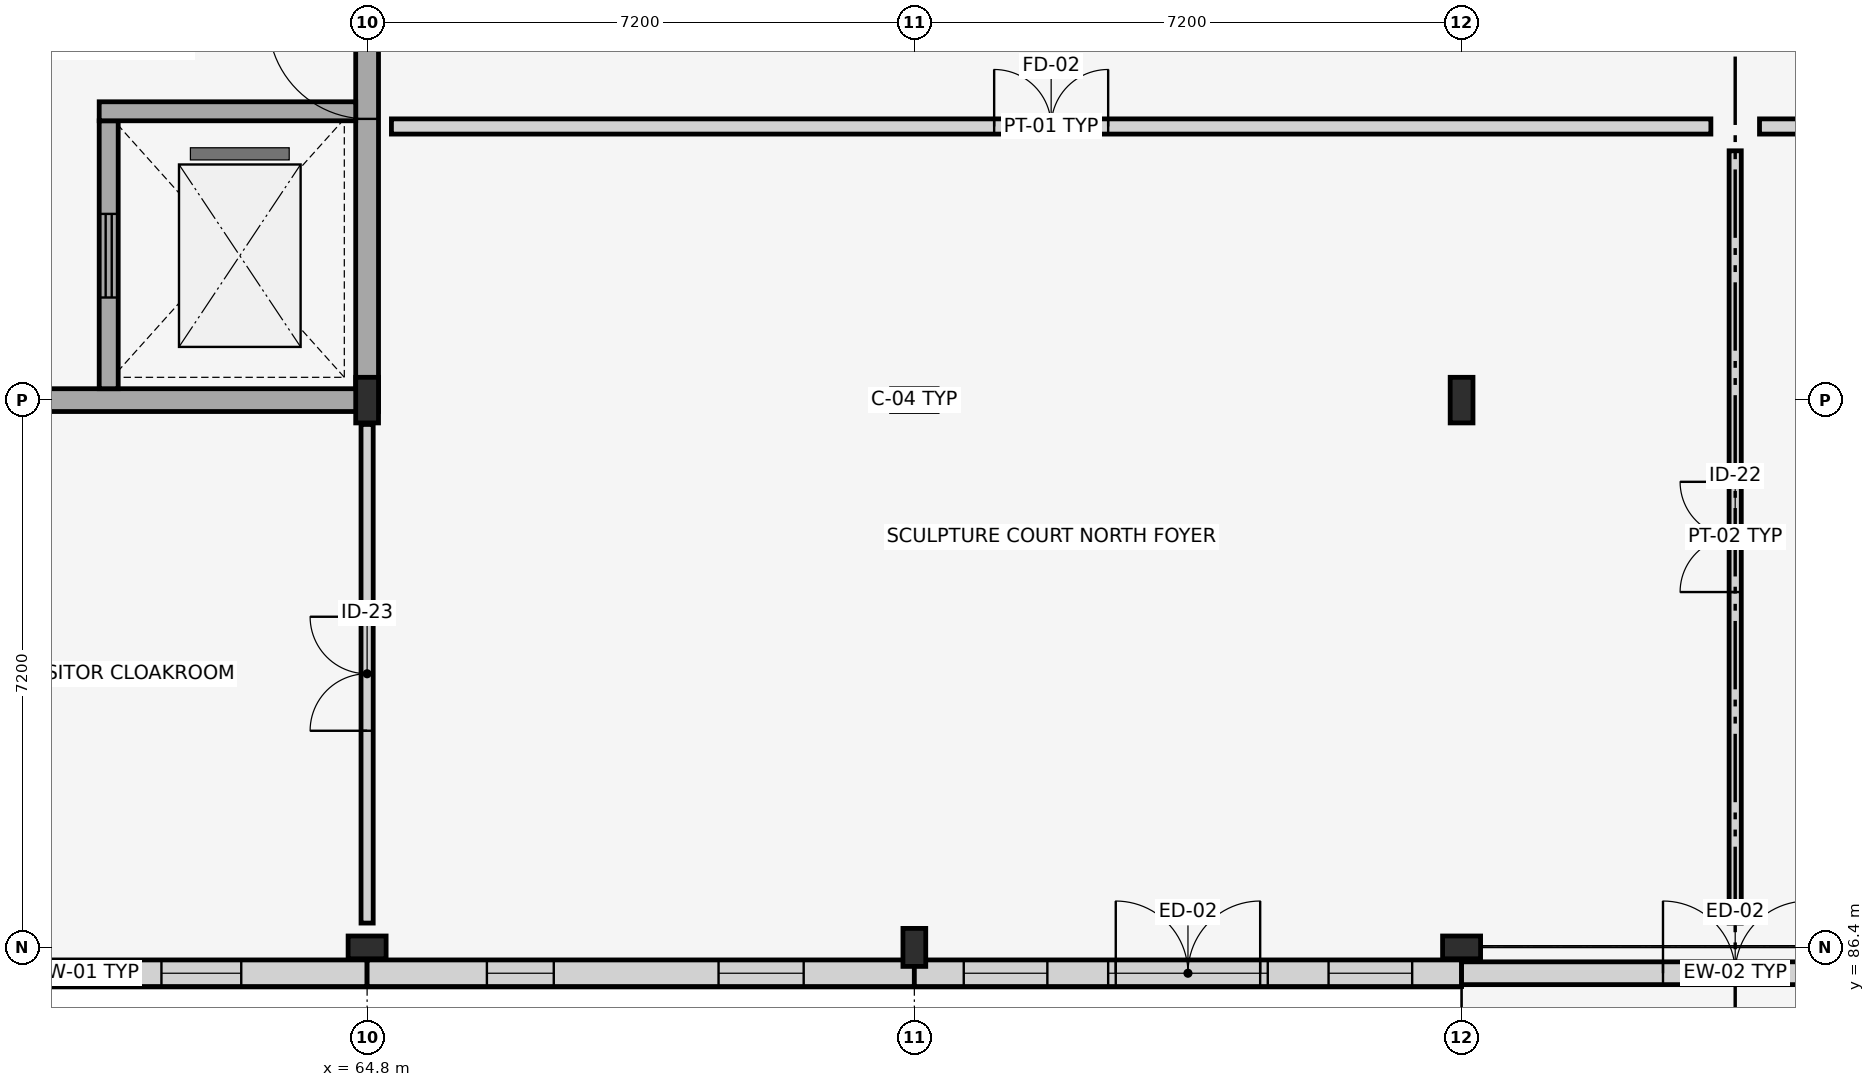
"""IFC4 building model, lengths in metres.
Left out: names, types, materials, properties, quantities, classifications, styles, units other than length and angle.
Written with IfcOpenShell. Run it as: python <this file> out.ifc"""

import sys

from ifc_helpers import new_model, si_unit, direction, frame, frame_2d, origin, origin_2d, place, context, subcontext, project, spatial, rectangle, i_section, extrude, element, fill, save


model = new_model("IFC4")
c1 = context("Model", 3, precision=1e-05, world=origin(), true_north=direction((0.0, 1.0)))
c2 = subcontext(c1, "Body", "Model", "MODEL_VIEW")
j1 = project(units=[si_unit("LENGTHUNIT", "METRE"), si_unit("PLANEANGLEUNIT", "RADIAN")], contexts=[c1])
p1 = place(None, origin())
s1 = spatial("IfcSite", under=j1, at=p1, CompositionType="ELEMENT")
p2 = place(p1, origin())
s2 = spatial("IfcBuilding", under=s1, at=p2, CompositionType="ELEMENT")
p3 = place(p2, origin())
s3 = spatial("IfcBuildingStorey", under=s2, at=p3, CompositionType="ELEMENT", Elevation=0.0)
p4 = place(p3, frame((64.8, 86.4, 0.0), z_axis=(0.0, 0.0, 1.0), x_axis=(0.0, 1.0, 0.0)))
e1 = element("IfcColumn", 1, at=p4, inside=s3, PredefinedType="COLUMN", context=c2, shape_type="SweptSolid", body=[
    extrude(i_section(OverallWidth=0.3, OverallDepth=0.5, WebThickness=0.014, FlangeThickness=0.028, FilletRadius=0.027, at=origin_2d()), origin(), (0.0, 0.0, 1.0), 4.5),
])
p5 = place(p3, frame((64.8, 93.6, 0.0), z_axis=(0.0, 0.0, 1.0), x_axis=(1.0, 0.0, 0.0)))
e2 = element("IfcColumn", 2, at=p5, inside=s3, PredefinedType="COLUMN", context=c2, shape_type="SweptSolid", body=[
    extrude(i_section(OverallWidth=0.3, OverallDepth=0.6, WebThickness=0.015, FlangeThickness=0.03, FilletRadius=0.027, at=origin_2d()), origin(), (0.0, 0.0, 1.0), 4.5),
])
p6 = place(p3, frame((72.0, 86.4, 0.0), z_axis=(0.0, 0.0, 1.0), x_axis=(1.0, 0.0, 0.0)))
e3 = element("IfcColumn", 3, at=p6, inside=s3, PredefinedType="COLUMN", context=c2, shape_type="SweptSolid", body=[
    extrude(i_section(OverallWidth=0.3, OverallDepth=0.5, WebThickness=0.014, FlangeThickness=0.028, FilletRadius=0.027, at=origin_2d()), origin(), (0.0, 0.0, 1.0), 4.5),
])
p7 = place(p3, frame((72.0, 93.6, 0.0), z_axis=(0.0, 0.0, 1.0), x_axis=(0.0, 1.0, 0.0)))
e4 = element("IfcColumn", 4, at=p7, inside=s3, PredefinedType="COLUMN", context=c2, shape_type="SweptSolid", body=[
    extrude(i_section(OverallWidth=0.3, OverallDepth=0.6, WebThickness=0.015, FlangeThickness=0.03, FilletRadius=0.027, at=origin_2d()), origin(), (0.0, 0.0, 1.0), 4.5),
])
p8 = place(p3, frame((79.2, 86.4, 0.0), z_axis=(0.0, 0.0, 1.0), x_axis=(0.0, 1.0, 0.0)))
e5 = element("IfcColumn", 5, at=p8, inside=s3, PredefinedType="COLUMN", context=c2, shape_type="SweptSolid", body=[
    extrude(i_section(OverallWidth=0.3, OverallDepth=0.5, WebThickness=0.014, FlangeThickness=0.028, FilletRadius=0.027, at=origin_2d()), origin(), (0.0, 0.0, 1.0), 4.5),
])
p9 = place(p3, frame((79.2, 93.6, 0.0), z_axis=(0.0, 0.0, 1.0), x_axis=(1.0, 0.0, 0.0)))
e6 = element("IfcColumn", 6, at=p9, inside=s3, PredefinedType="COLUMN", context=c2, shape_type="SweptSolid", body=[
    extrude(i_section(OverallWidth=0.3, OverallDepth=0.6, WebThickness=0.015, FlangeThickness=0.03, FilletRadius=0.027, at=origin_2d()), origin(), (0.0, 0.0, 1.0), 4.5),
])
p10 = place(p3, frame((57.435, 86.06, 0.0), z_axis=(0.0, 0.0, 1.0), x_axis=(1.0, 0.0, 0.0)))
e7 = element("IfcWall", 7, at=p10, inside=s3, PredefinedType="STANDARD", context=c2, shape_type="SweptSolid", body=[
    extrude(rectangle(XDim=7.365, YDim=0.35, at=frame_2d((3.683, 0.0))), origin(), (0.0, 0.0, 1.0), 4.5),
])
p11 = place(p10, frame((1.541, 0.0, 0.9)))
e8 = element("IfcOpeningElement", 8, at=p11, cuts=e7, PredefinedType="OPENING", context=c2, shape_type="SweptSolid", body=[
    extrude(rectangle(XDim=0.95, YDim=1.9, at=frame_2d((0.475, 0.95))), frame((0.0, 0.185, 0.0), z_axis=(0.0, -1.0, 0.0), x_axis=(1.0, 0.0, 0.0)), (0.0, 0.0, 1.0), 0.37),
])
p12 = place(p10, frame((4.659, 0.0, 0.9)))
e9 = element("IfcOpeningElement", 9, at=p12, cuts=e7, PredefinedType="OPENING", context=c2, shape_type="SweptSolid", body=[
    extrude(rectangle(XDim=1.05, YDim=2.15, at=frame_2d((0.525, 1.075))), frame((0.0, 0.185, 0.0), z_axis=(0.0, -1.0, 0.0), x_axis=(1.0, 0.0, 0.0)), (0.0, 0.0, 1.0), 0.37),
])
p13 = place(p3, frame((64.8, 86.06, 0.0), z_axis=(0.0, 0.0, 1.0), x_axis=(1.0, 0.0, 0.0)))
e10 = element("IfcWall", 10, at=p13, inside=s3, PredefinedType="STANDARD", context=c2, shape_type="SweptSolid", body=[
    extrude(rectangle(XDim=7.2, YDim=0.35, at=frame_2d((3.6, 0.0))), origin(), (0.0, 0.0, 1.0), 4.5),
])
p14 = place(p13, frame((1.576, 0.0, 0.9)))
e11 = element("IfcOpeningElement", 11, at=p14, cuts=e10, PredefinedType="OPENING", context=c2, shape_type="SweptSolid", body=[
    extrude(rectangle(XDim=0.88, YDim=1.54, at=frame_2d((0.44, 0.77))), frame((0.0, 0.185, 0.0), z_axis=(0.0, -1.0, 0.0), x_axis=(1.0, 0.0, 0.0)), (0.0, 0.0, 1.0), 0.37),
])
p15 = place(p13, frame((4.624, 0.0, 0.9)))
e12 = element("IfcOpeningElement", 12, at=p15, cuts=e10, PredefinedType="OPENING", context=c2, shape_type="SweptSolid", body=[
    extrude(rectangle(XDim=1.12, YDim=1.54, at=frame_2d((0.56, 0.77))), frame((0.0, 0.185, 0.0), z_axis=(0.0, -1.0, 0.0), x_axis=(1.0, 0.0, 0.0)), (0.0, 0.0, 1.0), 0.37),
])
p16 = place(p3, frame((72.0, 86.06, 0.0), z_axis=(0.0, 0.0, 1.0), x_axis=(1.0, 0.0, 0.0)))
e13 = element("IfcWall", 13, at=p16, inside=s3, PredefinedType="STANDARD", context=c2, shape_type="SweptSolid", body=[
    extrude(rectangle(XDim=7.2, YDim=0.35, at=frame_2d((3.6, 0.0))), origin(), (0.0, 0.0, 1.0), 4.5),
])
p17 = place(p16, frame((2.65, 0.0, 0.0)))
e14 = element("IfcOpeningElement", 14, at=p17, cuts=e13, PredefinedType="OPENING", context=c2, shape_type="SweptSolid", body=[
    extrude(rectangle(XDim=1.9, YDim=2.45, at=frame_2d((0.95, 1.225))), frame((0.0, 0.185, 0.0), z_axis=(0.0, -1.0, 0.0), x_axis=(1.0, 0.0, 0.0)), (0.0, 0.0, 1.0), 0.37),
])
p18 = place(p16, frame((2.55, 0.0, 2.6)))
e15 = element("IfcOpeningElement", 15, at=p18, cuts=e13, PredefinedType="OPENING", context=c2, shape_type="SweptSolid", body=[
    extrude(rectangle(XDim=2.1, YDim=1.15, at=frame_2d((1.05, 0.575))), frame((0.0, 0.185, 0.0), z_axis=(0.0, -1.0, 0.0), x_axis=(1.0, 0.0, 0.0)), (0.0, 0.0, 1.0), 0.37),
])
p19 = place(p16, frame((0.65, 0.0, 0.35)))
e16 = element("IfcOpeningElement", 16, at=p19, cuts=e13, PredefinedType="OPENING", context=c2, shape_type="SweptSolid", body=[
    extrude(rectangle(XDim=1.1, YDim=2.0, at=frame_2d((0.55, 1.0))), frame((0.0, 0.185, 0.0), z_axis=(0.0, -1.0, 0.0), x_axis=(1.0, 0.0, 0.0)), (0.0, 0.0, 1.0), 0.37),
])
p20 = place(p16, frame((5.45, 0.0, 0.35)))
e17 = element("IfcOpeningElement", 17, at=p20, cuts=e13, PredefinedType="OPENING", context=c2, shape_type="SweptSolid", body=[
    extrude(rectangle(XDim=1.1, YDim=2.0, at=frame_2d((0.55, 1.0))), frame((0.0, 0.185, 0.0), z_axis=(0.0, -1.0, 0.0), x_axis=(1.0, 0.0, 0.0)), (0.0, 0.0, 1.0), 0.37),
])
p21 = place(p3, frame((79.2, 86.06, 0.0), z_axis=(0.0, 0.0, 1.0), x_axis=(1.0, 0.0, 0.0)))
e18 = element("IfcWall", 18, at=p21, inside=s3, PredefinedType="STANDARD", context=c2, shape_type="SweptSolid", body=[
    extrude(rectangle(XDim=7.2, YDim=0.3, at=frame_2d((3.6, 0.0))), origin(), (0.0, 0.0, 1.0), 3.95),
])
p22 = place(p21, frame((2.65, 0.0, 0.0)))
e19 = element("IfcOpeningElement", 19, at=p22, cuts=e18, PredefinedType="OPENING", context=c2, shape_type="SweptSolid", body=[
    extrude(rectangle(XDim=1.9, YDim=2.45, at=frame_2d((0.95, 1.225))), frame((0.0, 0.16, 0.0), z_axis=(0.0, -1.0, 0.0), x_axis=(1.0, 0.0, 0.0)), (0.0, 0.0, 1.0), 0.32),
])
p23 = place(p3, frame((57.6, 93.6, 0.0), z_axis=(0.0, 0.0, 1.0), x_axis=(1.0, 0.0, 0.0)))
e20 = element("IfcWall", 20, at=p23, inside=s3, PredefinedType="SHEAR", context=c2, shape_type="SweptSolid", body=[
    extrude(rectangle(XDim=7.35, YDim=0.3, at=frame_2d((3.675, 0.0))), origin(), (0.0, 0.0, 1.0), 4.28),
])
p24 = place(p3, frame((64.8, 93.75, 0.0), z_axis=(0.0, 0.0, 1.0), x_axis=(0.0, 1.0, 0.0)))
e21 = element("IfcWall", 21, at=p24, inside=s3, PredefinedType="SHEAR", context=c2, shape_type="SweptSolid", body=[
    extrude(rectangle(XDim=14.1, YDim=0.3, at=frame_2d((7.05, 0.0))), origin(), (0.0, 0.0, 1.0), 4.28),
])
p25 = place(p24, frame((3.55, 0.0, 0.0)))
e22 = element("IfcOpeningElement", 22, at=p25, cuts=e21, PredefinedType="OPENING", context=c2, shape_type="SweptSolid", body=[
    extrude(rectangle(XDim=1.3, YDim=2.2, at=frame_2d((0.65, 1.1))), frame((0.0, 0.16, 0.0), z_axis=(0.0, -1.0, 0.0), x_axis=(1.0, 0.0, 0.0)), (0.0, 0.0, 1.0), 0.32),
])
p26 = place(p24, frame((7.85, 0.0, 0.0)))
e23 = element("IfcOpeningElement", 23, at=p26, cuts=e21, PredefinedType="OPENING", context=c2, shape_type="SweptSolid", body=[
    extrude(rectangle(XDim=1.05, YDim=2.15, at=frame_2d((0.525, 1.075))), frame((0.0, 0.16, 0.0), z_axis=(0.0, -1.0, 0.0), x_axis=(1.0, 0.0, 0.0)), (0.0, 0.0, 1.0), 0.32),
])
p27 = place(p24, frame((10.55, 0.0, 0.0)))
e24 = element("IfcOpeningElement", 24, at=p27, cuts=e21, PredefinedType="OPENING", context=c2, shape_type="SweptSolid", body=[
    extrude(rectangle(XDim=1.0, YDim=2.15, at=frame_2d((0.5, 1.075))), frame((0.0, 0.16, 0.0), z_axis=(0.0, -1.0, 0.0), x_axis=(1.0, 0.0, 0.0)), (0.0, 0.0, 1.0), 0.32),
])
p28 = place(p3, frame((61.4, 93.75, 0.0), z_axis=(0.0, 0.0, 1.0), x_axis=(0.0, 1.0, 0.0)))
e25 = element("IfcWall", 25, at=p28, inside=s3, PredefinedType="SHEAR", context=c2, shape_type="SweptSolid", body=[
    extrude(rectangle(XDim=3.525, YDim=0.25, at=frame_2d((1.762, 0.0))), origin(), (0.0, 0.0, 1.0), 4.28),
])
p29 = place(p28, frame((1.2, 0.0, 0.0)))
e26 = element("IfcOpeningElement", 26, at=p29, cuts=e25, PredefinedType="OPENING", context=c2, shape_type="SweptSolid", body=[
    extrude(rectangle(XDim=1.1, YDim=2.15, at=frame_2d((0.55, 1.075))), frame((0.0, 0.135, 0.0), z_axis=(0.0, -1.0, 0.0), x_axis=(1.0, 0.0, 0.0)), (0.0, 0.0, 1.0), 0.27),
])
p30 = place(p3, frame((61.275, 97.4, 0.0), z_axis=(0.0, 0.0, 1.0), x_axis=(1.0, 0.0, 0.0)))
e27 = element("IfcWall", 27, at=p30, inside=s3, PredefinedType="SHEAR", context=c2, shape_type="SweptSolid", body=[
    extrude(rectangle(XDim=3.375, YDim=0.25, at=frame_2d((1.688, 0.0))), origin(), (0.0, 0.0, 1.0), 4.28),
])
p31 = place(p3, frame((65.12, 97.2, 0.0), z_axis=(0.0, 0.0, 1.0), x_axis=(1.0, 0.0, 0.0)))
e28 = element("IfcWall", 28, at=p31, inside=s3, PredefinedType="PARTITIONING", context=c2, shape_type="SweptSolid", body=[
    extrude(rectangle(XDim=17.36, YDim=0.2, at=frame_2d((8.68, 0.0))), origin(), (0.0, 0.0, 1.0), 3.45),
])
p32 = place(p31, frame((7.93, 0.0, 0.0)))
e29 = element("IfcOpeningElement", 29, at=p32, cuts=e28, PredefinedType="OPENING", context=c2, shape_type="SweptSolid", body=[
    extrude(rectangle(XDim=1.5, YDim=2.25, at=frame_2d((0.75, 1.125))), frame((0.0, 0.11, 0.0), z_axis=(0.0, -1.0, 0.0), x_axis=(1.0, 0.0, 0.0)), (0.0, 0.0, 1.0), 0.22),
])
p33 = place(p3, frame((83.12, 97.2, 0.0), z_axis=(0.0, 0.0, 1.0), x_axis=(1.0, 0.0, 0.0)))
e30 = element("IfcWall", 30, at=p33, inside=s3, PredefinedType="PARTITIONING", context=c2, shape_type="SweptSolid", body=[
    extrude(rectangle(XDim=17.36, YDim=0.2, at=frame_2d((8.68, 0.0))), origin(), (0.0, 0.0, 1.0), 3.45),
])
p34 = place(p33, frame((7.88, 0.0, 0.0)))
e31 = element("IfcOpeningElement", 31, at=p34, cuts=e30, PredefinedType="OPENING", context=c2, shape_type="SweptSolid", body=[
    extrude(rectangle(XDim=1.6, YDim=2.35, at=frame_2d((0.8, 1.175))), frame((0.0, 0.11, 0.0), z_axis=(0.0, -1.0, 0.0), x_axis=(1.0, 0.0, 0.0)), (0.0, 0.0, 1.0), 0.22),
])
p35 = place(p3, frame((82.8, 86.72, 0.0), z_axis=(0.0, 0.0, 1.0), x_axis=(0.0, 1.0, 0.0)))
e32 = element("IfcWall", 32, at=p35, inside=s3, PredefinedType="PARTITIONING", context=c2, shape_type="SweptSolid", body=[
    extrude(rectangle(XDim=10.16, YDim=0.16, at=frame_2d((5.08, 0.0))), origin(), (0.0, 0.0, 1.0), 3.45),
])
p36 = place(p35, frame((4.355, 0.0, 0.0)))
e33 = element("IfcOpeningElement", 33, at=p36, cuts=e32, PredefinedType="OPENING", context=c2, shape_type="SweptSolid", body=[
    extrude(rectangle(XDim=1.45, YDim=2.35, at=frame_2d((0.725, 1.175))), frame((0.0, 0.09, 0.0), z_axis=(0.0, -1.0, 0.0), x_axis=(1.0, 0.0, 0.0)), (0.0, 0.0, 1.0), 0.18),
])
p37 = place(p3, frame((64.8, 86.72, 0.0), z_axis=(0.0, 0.0, 1.0), x_axis=(0.0, 1.0, 0.0)))
e34 = element("IfcWall", 34, at=p37, inside=s3, PredefinedType="PARTITIONING", context=c2, shape_type="SweptSolid", body=[
    extrude(rectangle(XDim=6.56, YDim=0.16, at=frame_2d((3.28, 0.0))), origin(), (0.0, 0.0, 1.0), 3.45),
])
p38 = place(p37, frame((2.53, 0.0, 0.0)))
e35 = element("IfcOpeningElement", 35, at=p38, cuts=e34, PredefinedType="OPENING", context=c2, shape_type="SweptSolid", body=[
    extrude(rectangle(XDim=1.5, YDim=2.5, at=frame_2d((0.75, 1.25))), frame((0.0, 0.09, 0.0), z_axis=(0.0, -1.0, 0.0), x_axis=(1.0, 0.0, 0.0)), (0.0, 0.0, 1.0), 0.18),
])
p39 = place(p12, origin())
e36 = element("IfcWindow", 36, at=p39, inside=s3, PartitioningType="SINGLE_PANEL", PredefinedType="WINDOW", context=c2, shape_type="SweptSolid", body=[
    extrude(rectangle(XDim=1.05, YDim=2.15, at=frame_2d((0.525, 1.075))), frame((0.0, 0.03, 0.0), z_axis=(0.0, -1.0, 0.0), x_axis=(1.0, 0.0, 0.0)), (0.0, 0.0, 1.0), 0.06),
])
fill(e9, e36)
p40 = place(p14, origin())
e37 = element("IfcWindow", 37, at=p40, inside=s3, PartitioningType="SINGLE_PANEL", PredefinedType="WINDOW", context=c2, shape_type="SweptSolid", body=[
    extrude(rectangle(XDim=0.88, YDim=1.54, at=frame_2d((0.44, 0.77))), frame((0.0, 0.03, 0.0), z_axis=(0.0, -1.0, 0.0), x_axis=(1.0, 0.0, 0.0)), (0.0, 0.0, 1.0), 0.06),
])
fill(e11, e37)
p41 = place(p15, origin())
e38 = element("IfcWindow", 38, at=p41, inside=s3, PartitioningType="SINGLE_PANEL", PredefinedType="WINDOW", context=c2, shape_type="SweptSolid", body=[
    extrude(rectangle(XDim=1.12, YDim=1.54, at=frame_2d((0.56, 0.77))), frame((0.0, 0.03, 0.0), z_axis=(0.0, -1.0, 0.0), x_axis=(1.0, 0.0, 0.0)), (0.0, 0.0, 1.0), 0.06),
])
fill(e12, e38)
p42 = place(p17, origin())
e39 = element("IfcDoor", 39, at=p42, inside=s3, OperationType="DOUBLE_DOOR_SINGLE_SWING", PredefinedType="DOOR", context=c2, shape_type="SweptSolid", body=[
    extrude(rectangle(XDim=1.9, YDim=2.45, at=frame_2d((0.95, 1.225))), frame((0.0, 0.025, 0.0), z_axis=(0.0, -1.0, 0.0), x_axis=(1.0, 0.0, 0.0)), (0.0, 0.0, 1.0), 0.05),
])
fill(e14, e39)
p43 = place(p18, origin())
e40 = element("IfcWindow", 40, at=p43, inside=s3, PartitioningType="SINGLE_PANEL", PredefinedType="WINDOW", context=c2, shape_type="SweptSolid", body=[
    extrude(rectangle(XDim=2.1, YDim=1.15, at=frame_2d((1.05, 0.575))), frame((0.0, 0.03, 0.0), z_axis=(0.0, -1.0, 0.0), x_axis=(1.0, 0.0, 0.0)), (0.0, 0.0, 1.0), 0.06),
])
fill(e15, e40)
p44 = place(p19, origin())
e41 = element("IfcWindow", 41, at=p44, inside=s3, PartitioningType="SINGLE_PANEL", PredefinedType="WINDOW", context=c2, shape_type="SweptSolid", body=[
    extrude(rectangle(XDim=1.1, YDim=2.0, at=frame_2d((0.55, 1.0))), frame((0.0, 0.03, 0.0), z_axis=(0.0, -1.0, 0.0), x_axis=(1.0, 0.0, 0.0)), (0.0, 0.0, 1.0), 0.06),
])
fill(e16, e41)
p45 = place(p20, origin())
e42 = element("IfcWindow", 42, at=p45, inside=s3, PartitioningType="SINGLE_PANEL", PredefinedType="WINDOW", context=c2, shape_type="SweptSolid", body=[
    extrude(rectangle(XDim=1.1, YDim=2.0, at=frame_2d((0.55, 1.0))), frame((0.0, 0.03, 0.0), z_axis=(0.0, -1.0, 0.0), x_axis=(1.0, 0.0, 0.0)), (0.0, 0.0, 1.0), 0.06),
])
fill(e17, e42)
p46 = place(p22, origin())
e43 = element("IfcDoor", 43, at=p46, inside=s3, OperationType="DOUBLE_DOOR_SINGLE_SWING", PredefinedType="DOOR", context=c2, shape_type="SweptSolid", body=[
    extrude(rectangle(XDim=1.9, YDim=2.45, at=frame_2d((0.95, 1.225))), frame((0.0, 0.025, 0.0), z_axis=(0.0, -1.0, 0.0), x_axis=(1.0, 0.0, 0.0)), (0.0, 0.0, 1.0), 0.05),
])
fill(e19, e43)
p47 = place(p25, origin())
e44 = element("IfcDoor", 44, at=p47, inside=s3, OperationType="SINGLE_SWING_RIGHT", PredefinedType="DOOR", context=c2, shape_type="SweptSolid", body=[
    extrude(rectangle(XDim=1.3, YDim=2.2, at=frame_2d((0.65, 1.1))), frame((0.0, 0.025, 0.0), z_axis=(0.0, -1.0, 0.0), x_axis=(1.0, 0.0, 0.0)), (0.0, 0.0, 1.0), 0.05),
])
fill(e22, e44)
p48 = place(p29, origin())
e45 = element("IfcDoor", 45, at=p48, inside=s3, OperationType="SLIDING_TO_LEFT", PredefinedType="DOOR", context=c2, shape_type="SweptSolid", body=[
    extrude(rectangle(XDim=1.1, YDim=2.15, at=frame_2d((0.55, 1.075))), frame((0.0, 0.025, 0.0), z_axis=(0.0, -1.0, 0.0), x_axis=(1.0, 0.0, 0.0)), (0.0, 0.0, 1.0), 0.05),
])
fill(e26, e45)
p49 = place(p32, origin())
e46 = element("IfcDoor", 46, at=p49, inside=s3, OperationType="DOUBLE_DOOR_SINGLE_SWING", PredefinedType="DOOR", context=c2, shape_type="SweptSolid", body=[
    extrude(rectangle(XDim=1.5, YDim=2.25, at=frame_2d((0.75, 1.125))), frame((0.0, 0.025, 0.0), z_axis=(0.0, -1.0, 0.0), x_axis=(1.0, 0.0, 0.0)), (0.0, 0.0, 1.0), 0.05),
])
fill(e29, e46)
p50 = place(p36, origin())
e47 = element("IfcDoor", 47, at=p50, inside=s3, OperationType="DOUBLE_DOOR_SINGLE_SWING", PredefinedType="DOOR", context=c2, shape_type="SweptSolid", body=[
    extrude(rectangle(XDim=1.45, YDim=2.35, at=frame_2d((0.725, 1.175))), frame((0.0, 0.025, 0.0), z_axis=(0.0, -1.0, 0.0), x_axis=(1.0, 0.0, 0.0)), (0.0, 0.0, 1.0), 0.05),
])
fill(e33, e47)
p51 = place(p38, origin())
e48 = element("IfcDoor", 48, at=p51, inside=s3, OperationType="DOUBLE_DOOR_SINGLE_SWING", PredefinedType="DOOR", context=c2, shape_type="SweptSolid", body=[
    extrude(rectangle(XDim=1.5, YDim=2.5, at=frame_2d((0.75, 1.25))), frame((0.0, 0.025, 0.0), z_axis=(0.0, -1.0, 0.0), x_axis=(1.0, 0.0, 0.0)), (0.0, 0.0, 1.0), 0.05),
])
fill(e35, e48)
save(model, sys.argv[1])
